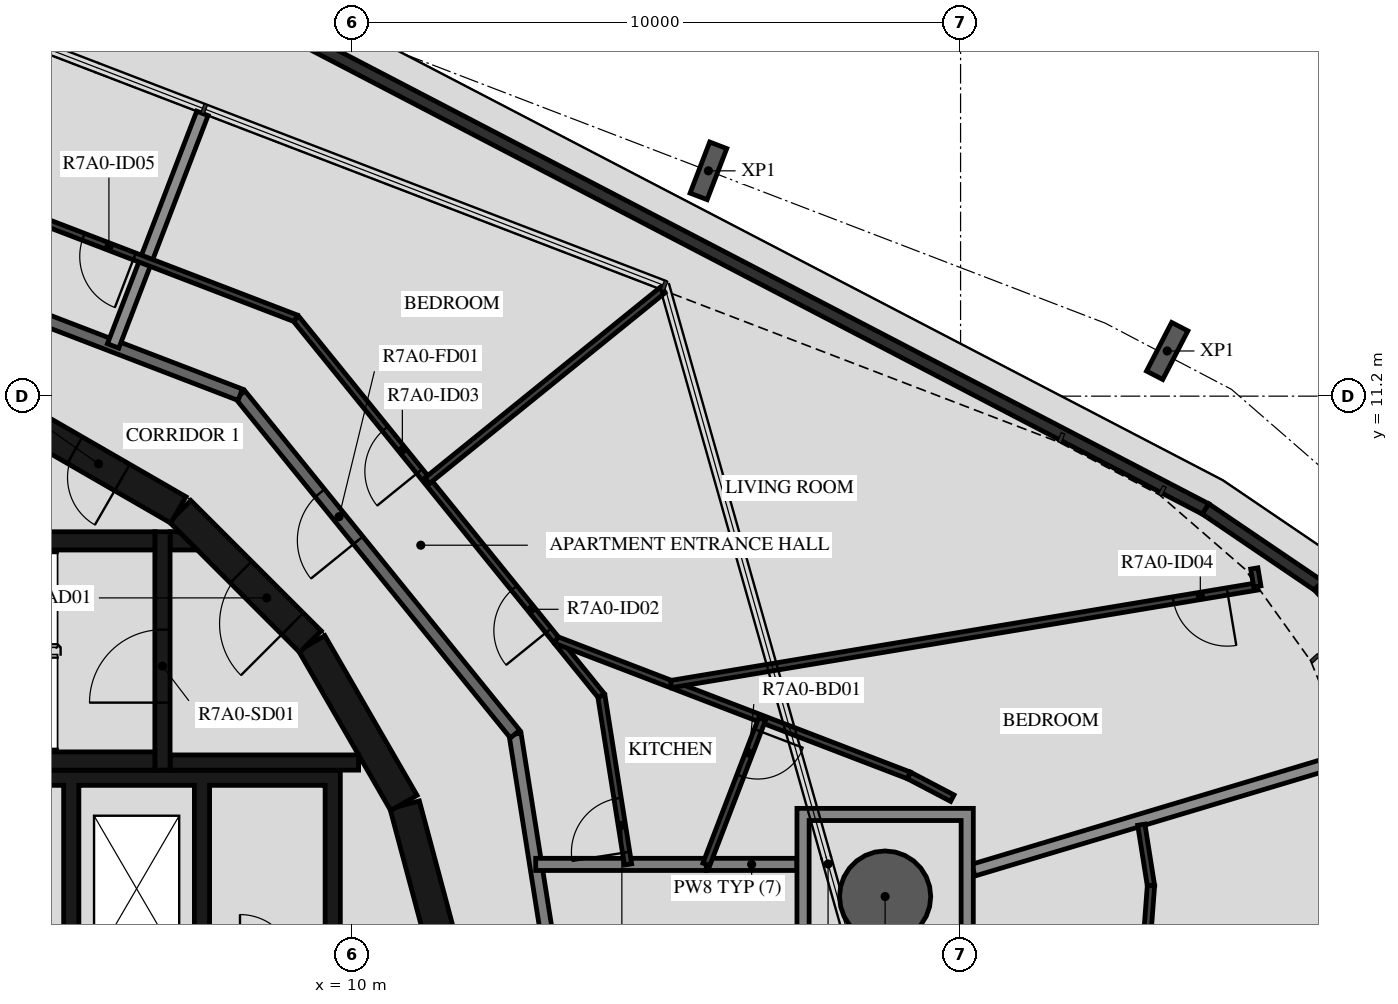
"""IFC4 building model, lengths in metres.
Left out: names, types, materials, properties, quantities, classifications, styles, units other than length and angle.
Written with IfcOpenShell. Run it as: python <this file> out.ifc"""

import sys

from ifc_helpers import new_model, si_unit, direction, frame, frame_2d, origin, origin_2d, place, context, subcontext, project, spatial, polyline, rectangle, hollow_circle, i_section, outline, extrude, element, fill, save


model = new_model("IFC4")
c1 = context("Model", 3, precision=1e-05, world=origin(), true_north=direction((0.0, 1.0)))
c2 = subcontext(c1, "Body", "Model", "MODEL_VIEW")
j1 = project(units=[si_unit("LENGTHUNIT", "METRE"), si_unit("PLANEANGLEUNIT", "RADIAN")], contexts=[c1])
p1 = place(None, origin())
s1 = spatial("IfcSite", under=j1, at=p1, CompositionType="ELEMENT")
p2 = place(p1, origin())
s2 = spatial("IfcBuilding", under=s1, at=p2, CompositionType="ELEMENT")
p3 = place(p2, frame((0.0, 0.0, 263.4)))
s3 = spatial("IfcBuildingStorey", under=s2, at=p3, CompositionType="ELEMENT", Elevation=263.4)
p4 = place(p3, frame((18.76, 2.971, -0.45), z_axis=(0.0, 0.0, 1.0), x_axis=(1.0, 0.0, 0.0)))
e1 = element("IfcColumn", 1, at=p4, inside=s3, PredefinedType="COLUMN", context=c2, shape_type="SweptSolid", body=[
    extrude(hollow_circle(Radius=0.75, WallThickness=0.035, at=origin_2d()), origin(), (0.0, 0.0, 1.0), 3.57),
])
for number, where, z_axis, x_axis in (
    (2, (23.398, 11.943, -0.45), (0.0, 0.0, 1.0), (0.888, -0.459, 0.0)),
    (3, (15.854, 14.905, -0.45), (0.0, 0.0, 1.0), (0.934, -0.358, 0.0)),
):
    element("IfcColumn", number, at=place(p3, frame(where, z_axis=z_axis, x_axis=x_axis)), inside=s3, PredefinedType="COLUMN", context=c2, shape_type="SweptSolid", body=[
        extrude(i_section(OverallWidth=0.3, OverallDepth=0.9, WebThickness=0.019, FlangeThickness=0.035, FilletRadius=0.03, at=origin_2d()), origin(), (0.0, 0.0, 1.0), 3.57),
    ])
p5 = place(p3, frame((-6.133, 25.046, 0.03), z_axis=(0.0, 0.0, 1.0), x_axis=(0.887010202007, -0.461749825701, 0.0)))
e4 = element("IfcWall", 4, at=p5, inside=s3, PredefinedType="PARAPET", context=c2, shape_type="SweptSolid", body=[
    extrude(rectangle(XDim=34.009, YDim=0.2, at=frame_2d((17.004, 0.0))), origin(), (0.0, 0.0, 1.0), 1.5),
])
p6 = place(p3, frame((24.029, 9.345, 0.03), z_axis=(0.0, 0.0, 1.0), x_axis=(0.827412960447, -0.561593975114, 0.0)))
e5 = element("IfcWall", 5, at=p6, inside=s3, PredefinedType="PARAPET", context=c2, shape_type="SweptSolid", body=[
    extrude(rectangle(XDim=2.258, YDim=0.2, at=frame_2d((1.129, 0.0))), origin(), (0.0, 0.0, 1.0), 1.5),
])
p7 = place(p3, frame((25.888, 8.085, 0.03), z_axis=(0.0, 0.0, 1.0), x_axis=(0.675590656091, -0.737276925858, 0.0)))
e6 = element("IfcWall", 6, at=p7, inside=s3, PredefinedType="PARAPET", context=c2, shape_type="SweptSolid", body=[
    extrude(rectangle(XDim=2.228, YDim=0.2, at=frame_2d((1.114, 0.0))), origin(), (0.0, 0.0, 1.0), 1.5),
])
for number, where, z_axis, x_axis in (
    (7, (11.643, 1.55, 0.0), (0.0, 0.0, 1.0), (-0.259, 0.966, 0.0)),
    (8, (10.845, 4.51, 0.0), (0.0, 0.0, 1.0), (-0.5, 0.866, 0.0)),
):
    element("IfcWall", number, at=place(p3, frame(where, z_axis=z_axis, x_axis=x_axis)), inside=s3, PredefinedType="SHEAR", context=c2, shape_type="SweptSolid", body=[
        extrude(rectangle(XDim=3.033, YDim=0.5, at=frame_2d((1.516, 0.0))), origin(), (0.0, 0.0, 1.0), 3.12),
    ])
p8 = place(p3, frame((9.308, 7.164, 0.0), z_axis=(0.0, 0.0, 1.0), x_axis=(-0.707106781187, 0.707106781187, 0.0)))
e9 = element("IfcWall", 9, at=p8, inside=s3, PredefinedType="SHEAR", context=c2, shape_type="SweptSolid", body=[
    extrude(rectangle(XDim=3.032, YDim=0.5, at=frame_2d((1.516, 0.0))), origin(), (0.0, 0.0, 1.0), 3.12),
])
p9 = place(p8, frame((0.416, 0.0, 0.0)))
e10 = element("IfcOpeningElement", 10, at=p9, cuts=e9, PredefinedType="OPENING", context=c2, shape_type="SweptSolid", body=[
    extrude(rectangle(XDim=1.2, YDim=2.1, at=frame_2d((0.6, 1.05))), frame((0.0, 0.26, 0.0), z_axis=(0.0, -1.0, 0.0), x_axis=(1.0, 0.0, 0.0)), (0.0, 0.0, 1.0), 0.52),
])
p10 = place(p3, frame((7.137, 9.329, 0.0), z_axis=(0.0, 0.0, 1.0), x_axis=(-0.865975092491, 0.500087131594, 0.0)))
e11 = element("IfcWall", 11, at=p10, inside=s3, PredefinedType="SHEAR", context=c2, shape_type="SweptSolid", body=[
    extrude(rectangle(XDim=3.033, YDim=0.5, at=frame_2d((1.516, 0.0))), origin(), (0.0, 0.0, 1.0), 3.12),
])
p11 = place(p10, frame((1.066, 0.0, 0.0)))
e12 = element("IfcOpeningElement", 12, at=p11, cuts=e11, PredefinedType="OPENING", context=c2, shape_type="SweptSolid", body=[
    extrude(rectangle(XDim=0.9, YDim=2.1, at=frame_2d((0.45, 1.05))), frame((0.0, 0.26, 0.0), z_axis=(0.0, -1.0, 0.0), x_axis=(1.0, 0.0, 0.0)), (0.0, 0.0, 1.0), 0.52),
])
for number, where, z_axis, x_axis in (
    (13, (0.0, 5.2, 0.0), (0.0, 0.0, 1.0), (1.0, 0.0, 0.0)),
    (14, (0.0, 8.82, 0.0), (0.0, 0.0, 1.0), (1.0, 0.0, 0.0)),
):
    element("IfcWall", number, at=place(p3, frame(where, z_axis=z_axis, x_axis=x_axis)), inside=s3, PredefinedType="SHEAR", context=c2, shape_type="SweptSolid", body=[
        extrude(rectangle(XDim=6.75, YDim=0.3, at=frame_2d((3.375, 0.0))), origin(), (0.0, 0.0, 1.0), 3.12),
    ])
p12 = place(p3, frame((6.875, 5.05, 0.0), z_axis=(0.0, 0.0, 1.0), x_axis=(0.0, 1.0, 0.0)))
e15 = element("IfcWall", 15, at=p12, inside=s3, PredefinedType="SHEAR", context=c2, shape_type="SweptSolid", body=[
    extrude(rectangle(XDim=3.92, YDim=0.25, at=frame_2d((1.96, 0.0))), origin(), (0.0, 0.0, 1.0), 3.12),
])
p13 = place(p12, frame((1.11, 0.0, 0.0)))
e16 = element("IfcOpeningElement", 16, at=p13, cuts=e15, PredefinedType="OPENING", context=c2, shape_type="SweptSolid", body=[
    extrude(rectangle(XDim=1.2, YDim=2.1, at=frame_2d((0.6, 1.05))), frame((0.0, 0.135, 0.0), z_axis=(0.0, -1.0, 0.0), x_axis=(1.0, 0.0, 0.0)), (0.0, 0.0, 1.0), 0.27),
])
p14 = place(p3, frame((7.0, 5.175, 0.0), z_axis=(0.0, 0.0, 1.0), x_axis=(1.0, 0.0, 0.0)))
e17 = element("IfcWall", 17, at=p14, inside=s3, PredefinedType="SHEAR", context=c2, shape_type="SweptSolid", body=[
    extrude(rectangle(XDim=3.1, YDim=0.25, at=frame_2d((1.55, 0.0))), origin(), (0.0, 0.0, 1.0), 3.12),
])
p15 = place(p3, origin())
e18 = element("IfcWall", 18, at=p15, inside=s3, PredefinedType="SHEAR", context=c2, shape_type="SweptSolid", body=[
    extrude(outline(polyline([(7.448, 8.67), (7.0, 8.67), (7.0, 8.97), (7.148, 8.97), (7.448, 8.67)])), origin(), (0.0, 0.0, 1.0), 3.12),
])
p16 = place(p3, origin())
e19 = element("IfcWall", 19, at=p16, inside=s3, PredefinedType="SHEAR", context=c2, shape_type="SweptSolid", body=[
    extrude(outline(polyline([(-9.8, 1.9), (-9.55, 1.9), (-9.55, 4.8), (3.1, 4.8), (3.1, 1.9), (3.35, 1.9), (3.35, 4.8), (5.25, 4.8), (5.25, 1.9), (5.5, 1.9), (5.5, 4.8), (7.4, 4.8), (7.4, 1.9), (7.65, 1.9), (7.65, 4.8), (9.55, 4.8), (9.55, 1.9), (9.8, 1.9), (9.8, 4.8), (9.8, 5.05), (-9.8, 5.05), (-9.8, 4.8), (-9.8, 1.9)])), origin(), (0.0, 0.0, 1.0), 3.12),
])
p17 = place(p3, frame((13.797, -1.45, 0.0), z_axis=(0.0, 0.0, 1.0), x_axis=(-0.156421704315, 0.987690361611, 0.0)))
e20 = element("IfcWall", 20, at=p17, inside=s3, PredefinedType="STANDARD", context=c2, shape_type="SweptSolid", body=[
    extrude(rectangle(XDim=7.181, YDim=0.2, at=frame_2d((3.591, 0.0))), origin(), (0.0, 0.0, 1.0), 3.12),
])
p18 = place(p3, frame((12.673, 5.643, 0.0), z_axis=(0.0, 0.0, 1.0), x_axis=(-0.629302871585, 0.777160148113, 0.0)))
e21 = element("IfcWall", 21, at=p18, inside=s3, PredefinedType="STANDARD", context=c2, shape_type="SweptSolid", body=[
    extrude(rectangle(XDim=7.181, YDim=0.2, at=frame_2d((3.59, 0.0))), origin(), (0.0, 0.0, 1.0), 3.12),
])
p19 = place(p18, frame((4.1, 0.0, 0.0)))
e22 = element("IfcOpeningElement", 22, at=p19, cuts=e21, PredefinedType="OPENING", context=c2, shape_type="SweptSolid", body=[
    extrude(rectangle(XDim=1.0, YDim=2.1, at=frame_2d((0.5, 1.05))), frame((0.0, 0.11, 0.0), z_axis=(0.0, -1.0, 0.0), x_axis=(1.0, 0.0, 0.0)), (0.0, 0.0, 1.0), 0.22),
])
p20 = place(p3, frame((8.154, 11.223, 0.0), z_axis=(0.0, 0.0, 1.0), x_axis=(-0.93359073609, 0.358341090983, 0.0)))
e23 = element("IfcWall", 23, at=p20, inside=s3, PredefinedType="STANDARD", context=c2, shape_type="SweptSolid", body=[
    extrude(rectangle(XDim=7.181, YDim=0.2, at=frame_2d((3.59, 0.0))), origin(), (0.0, 0.0, 1.0), 3.12),
])
p21 = place(p3, frame((15.819, 3.5, 0.0), z_axis=(0.0, 0.0, 1.0), x_axis=(-1.0, 0.0, 0.0)))
e24 = element("IfcWall", 24, at=p21, inside=s3, PredefinedType="STANDARD", context=c2, shape_type="SweptSolid", body=[
    extrude(rectangle(XDim=2.806, YDim=0.2, at=frame_2d((1.403, 0.0))), origin(), (0.0, 0.0, 1.0), 3.12),
])
p22 = place(p3, frame((17.309, 3.5, 0.0), z_axis=(0.0, 0.0, 1.0), x_axis=(-1.0, 0.0, 0.0)))
e25 = element("IfcWall", 25, at=p22, inside=s3, PredefinedType="STANDARD", context=c2, shape_type="SweptSolid", body=[
    extrude(rectangle(XDim=1.49, YDim=0.2, at=frame_2d((0.745, 0.0))), origin(), (0.0, 0.0, 1.0), 3.12),
])
p23 = place(p3, frame((7.532, 15.85, 0.0), z_axis=(0.0, 0.0, 1.0), x_axis=(-0.358355996975, -0.933585014571, 0.0)))
e26 = element("IfcWall", 26, at=p23, inside=s3, PredefinedType="STANDARD", context=c2, shape_type="SweptSolid", body=[
    extrude(rectangle(XDim=4.096, YDim=0.2, at=frame_2d((2.048, 0.0))), origin(), (0.0, 0.0, 1.0), 2.73),
])
p24 = place(p3, frame((20.209, 3.405, 0.0), z_axis=(0.0, 0.0, 1.0), x_axis=(0.957991224208, 0.286797514529, 0.0)))
e27 = element("IfcWall", 27, at=p24, inside=s3, PredefinedType="STANDARD", context=c2, shape_type="SweptSolid", body=[
    extrude(rectangle(XDim=6.471, YDim=0.2, at=frame_2d((3.236, 0.0))), origin(), (0.0, 0.0, 1.0), 2.73),
])
p25 = place(p3, frame((14.531, 3.5, 0.0), z_axis=(0.0, 0.0, 1.0), x_axis=(-0.1564580042, 0.987684612071, 0.0)))
e28 = element("IfcWall", 28, at=p25, inside=s3, PredefinedType="PARTITIONING", context=c2, shape_type="SweptSolid", body=[
    extrude(rectangle(XDim=2.809, YDim=0.12, at=frame_2d((1.404, 0.0))), origin(), (0.0, 0.0, 1.0), 3.12),
])
p26 = place(p25, frame((0.2, 0.0, 0.0)))
e29 = element("IfcOpeningElement", 29, at=p26, cuts=e28, PredefinedType="OPENING", context=c2, shape_type="SweptSolid", body=[
    extrude(rectangle(XDim=0.9, YDim=2.1, at=frame_2d((0.45, 1.05))), frame((0.0, 0.07, 0.0), z_axis=(0.0, -1.0, 0.0), x_axis=(1.0, 0.0, 0.0)), (0.0, 0.0, 1.0), 0.14),
])
p27 = place(p3, frame((14.092, 6.274, 0.0), z_axis=(0.0, 0.0, 1.0), x_axis=(-0.62933367237, 0.777135206268, 0.0)))
e30 = element("IfcWall", 30, at=p27, inside=s3, PredefinedType="PARTITIONING", context=c2, shape_type="SweptSolid", body=[
    extrude(rectangle(XDim=7.985, YDim=0.12, at=frame_2d((3.992, 0.0))), origin(), (0.0, 0.0, 1.0), 3.12),
])
p28 = place(p27, frame((1.378, 0.0, 0.0)))
e31 = element("IfcOpeningElement", 31, at=p28, cuts=e30, PredefinedType="OPENING", context=c2, shape_type="SweptSolid", body=[
    extrude(rectangle(XDim=0.9, YDim=2.1, at=frame_2d((0.45, 1.05))), frame((0.0, 0.07, 0.0), z_axis=(0.0, -1.0, 0.0), x_axis=(1.0, 0.0, 0.0)), (0.0, 0.0, 1.0), 0.14),
])
p29 = place(p27, frame((4.749, 0.0, 0.0)))
e32 = element("IfcOpeningElement", 32, at=p29, cuts=e30, PredefinedType="OPENING", context=c2, shape_type="SweptSolid", body=[
    extrude(rectangle(XDim=0.9, YDim=2.1, at=frame_2d((0.45, 1.05))), frame((0.0, 0.07, 0.0), z_axis=(0.0, -1.0, 0.0), x_axis=(1.0, 0.0, 0.0)), (0.0, 0.0, 1.0), 0.14),
])
p30 = place(p3, frame((9.067, 12.479, 0.0), z_axis=(0.0, 0.0, 1.0), x_axis=(-0.933579449035, 0.358370495911, 0.0)))
e33 = element("IfcWall", 33, at=p30, inside=s3, PredefinedType="PARTITIONING", context=c2, shape_type="SweptSolid", body=[
    extrude(rectangle(XDim=7.985, YDim=0.12, at=frame_2d((3.992, 0.0))), origin(), (0.0, 0.0, 1.0), 3.12),
])
p31 = place(p30, frame((2.841, 0.0, 0.0)))
e34 = element("IfcOpeningElement", 34, at=p31, cuts=e33, PredefinedType="OPENING", context=c2, shape_type="SweptSolid", body=[
    extrude(rectangle(XDim=0.9, YDim=2.1, at=frame_2d((0.45, 1.05))), frame((0.0, 0.07, 0.0), z_axis=(0.0, -1.0, 0.0), x_axis=(1.0, 0.0, 0.0)), (0.0, 0.0, 1.0), 0.14),
])
p32 = place(p3, frame((19.865, 4.589, 0.0), z_axis=(0.0, 0.0, 1.0), x_axis=(-0.885855229108, 0.46396175819, 0.0)))
e35 = element("IfcWall", 35, at=p32, inside=s3, PredefinedType="PARTITIONING", context=c2, shape_type="SweptSolid", body=[
    extrude(rectangle(XDim=0.807, YDim=0.12, at=frame_2d((0.403, 0.0))), origin(), (0.0, 0.0, 1.0), 3.12),
])
p33 = place(p3, frame((19.15, 4.963, 0.0), z_axis=(0.0, 0.0, 1.0), x_axis=(-0.933571304602, 0.358391711992, 0.0)))
e36 = element("IfcWall", 36, at=p33, inside=s3, PredefinedType="PARTITIONING", context=c2, shape_type="SweptSolid", body=[
    extrude(rectangle(XDim=6.212, YDim=0.12, at=frame_2d((3.106, 0.0))), origin(), (0.0, 0.0, 1.0), 3.12),
])
p34 = place(p3, frame((16.737, 5.89, 0.0), z_axis=(0.0, 0.0, 1.0), x_axis=(-0.358397454141, -0.933569100209, 0.0)))
e37 = element("IfcWall", 37, at=p34, inside=s3, PredefinedType="PARTITIONING", context=c2, shape_type="SweptSolid", body=[
    extrude(rectangle(XDim=2.56, YDim=0.12, at=frame_2d((1.28, 0.0))), origin(), (0.0, 0.0, 1.0), 3.12),
])
p35 = place(p34, frame((0.2, 0.0, 0.0)))
e38 = element("IfcOpeningElement", 38, at=p35, cuts=e37, PredefinedType="OPENING", context=c2, shape_type="SweptSolid", body=[
    extrude(rectangle(XDim=0.8, YDim=2.1, at=frame_2d((0.4, 1.05))), frame((0.0, 0.07, 0.0), z_axis=(0.0, -1.0, 0.0), x_axis=(1.0, 0.0, 0.0)), (0.0, 0.0, 1.0), 0.14),
])
p36 = place(p3, frame((24.88, 8.071, 0.0), z_axis=(0.0, 0.0, 1.0), x_axis=(-0.986414168431, -0.164277473558, 0.0)))
e39 = element("IfcWall", 39, at=p36, inside=s3, PredefinedType="PARTITIONING", context=c2, shape_type="SweptSolid", body=[
    extrude(rectangle(XDim=9.774, YDim=0.12, at=frame_2d((4.887, 0.0))), origin(), (0.0, 0.0, 1.0), 3.12),
])
p37 = place(p36, frame((0.5, 0.0, 0.0)))
e40 = element("IfcOpeningElement", 40, at=p37, cuts=e39, PredefinedType="OPENING", context=c2, shape_type="SweptSolid", body=[
    extrude(rectangle(XDim=0.9, YDim=2.1, at=frame_2d((0.45, 1.05))), frame((0.0, 0.07, 0.0), z_axis=(0.0, -1.0, 0.0), x_axis=(1.0, 0.0, 0.0)), (0.0, 0.0, 1.0), 0.14),
])
p38 = place(p3, frame((15.101, 12.945, 0.0), z_axis=(0.0, 0.0, 1.0), x_axis=(-0.777178675378, -0.629279990575, 0.0)))
e41 = element("IfcWall", 41, at=p38, inside=s3, PredefinedType="PARTITIONING", context=c2, shape_type="SweptSolid", body=[
    extrude(rectangle(XDim=4.982, YDim=0.12, at=frame_2d((2.491, 0.0))), origin(), (0.0, 0.0, 1.0), 3.12),
])
p39 = place(p3, frame((22.972, 4.153, 0.0), z_axis=(0.0, 0.0, 1.0), x_axis=(0.156209385929, -0.987723963336, 0.0)))
e42 = element("IfcWall", 42, at=p39, inside=s3, PredefinedType="PARTITIONING", context=c2, shape_type="SweptSolid", body=[
    extrude(rectangle(XDim=1.016, YDim=0.12, at=frame_2d((0.508, 0.0))), origin(), (0.0, 0.0, 1.0), 3.12),
])
p40 = place(p3, frame((23.131, 3.149, 0.0), z_axis=(0.0, 0.0, 1.0), x_axis=(-0.075446997935, -0.99714981347, 0.0)))
e43 = element("IfcWall", 43, at=p40, inside=s3, PredefinedType="PARTITIONING", context=c2, shape_type="SweptSolid", body=[
    extrude(rectangle(XDim=1.016, YDim=0.12, at=frame_2d((0.508, 0.0))), origin(), (0.0, 0.0, 1.0), 3.12),
])
p41 = place(p3, frame((24.88, 8.071, 0.0), z_axis=(0.0, 0.0, 1.0), x_axis=(-0.164398987305, 0.986393923832, 0.0)))
e44 = element("IfcWall", 44, at=p41, inside=s3, PredefinedType="PARTITIONING", context=c2, shape_type="SweptSolid", body=[
    extrude(rectangle(XDim=0.3, YDim=0.12, at=frame_2d((0.15, 0.0))), origin(), (0.0, 0.0, 1.0), 3.12),
])
p42 = place(p3, origin())
e45 = element("IfcWall", 45, at=p42, inside=s3, PredefinedType="STANDARD", context=c2, shape_type="SweptSolid", body=[
    extrude(outline(polyline([(20.209, 4.421), (20.209, 1.521), (17.309, 1.521), (17.309, 4.421), (20.209, 4.421)]), holes=[polyline([(17.51, 1.721), (20.01, 1.721), (20.01, 4.221), (17.51, 4.221), (17.51, 1.721)])]), origin(), (0.0, 0.0, 1.0), 3.12),
])
p43 = place(p13, origin())
e46 = element("IfcDoor", 46, at=p43, inside=s3, OperationType="SINGLE_SWING_LEFT", PredefinedType="DOOR", context=c2, shape_type="SweptSolid", body=[
    extrude(rectangle(XDim=1.2, YDim=2.1, at=frame_2d((0.6, 1.05))), frame((0.0, 0.025, 0.0), z_axis=(0.0, -1.0, 0.0), x_axis=(1.0, 0.0, 0.0)), (0.0, 0.0, 1.0), 0.05),
])
fill(e16, e46)
p44 = place(p9, origin())
e47 = element("IfcDoor", 47, at=p44, inside=s3, OperationType="SINGLE_SWING_RIGHT", PredefinedType="DOOR", context=c2, shape_type="SweptSolid", body=[
    extrude(rectangle(XDim=1.2, YDim=2.1, at=frame_2d((0.6, 1.05))), frame((0.0, 0.025, 0.0), z_axis=(0.0, -1.0, 0.0), x_axis=(1.0, 0.0, 0.0)), (0.0, 0.0, 1.0), 0.05),
])
fill(e10, e47)
p45 = place(p11, origin())
e48 = element("IfcDoor", 48, at=p45, inside=s3, OperationType="SINGLE_SWING_LEFT", PredefinedType="DOOR", context=c2, shape_type="SweptSolid", body=[
    extrude(rectangle(XDim=0.9, YDim=2.1, at=frame_2d((0.45, 1.05))), frame((0.0, 0.025, 0.0), z_axis=(0.0, -1.0, 0.0), x_axis=(1.0, 0.0, 0.0)), (0.0, 0.0, 1.0), 0.05),
])
fill(e12, e48)
p46 = place(p19, origin())
e49 = element("IfcDoor", 49, at=p46, inside=s3, OperationType="SINGLE_SWING_LEFT", PredefinedType="DOOR", context=c2, shape_type="SweptSolid", body=[
    extrude(rectangle(XDim=1.0, YDim=2.1, at=frame_2d((0.5, 1.05))), frame((0.0, 0.025, 0.0), z_axis=(0.0, -1.0, 0.0), x_axis=(1.0, 0.0, 0.0)), (0.0, 0.0, 1.0), 0.05),
])
fill(e22, e49)
p47 = place(p26, origin())
e50 = element("IfcDoor", 50, at=p47, inside=s3, OperationType="SINGLE_SWING_LEFT", PredefinedType="DOOR", context=c2, shape_type="SweptSolid", body=[
    extrude(rectangle(XDim=0.9, YDim=2.1, at=frame_2d((0.45, 1.05))), frame((0.0, 0.025, 0.0), z_axis=(0.0, -1.0, 0.0), x_axis=(1.0, 0.0, 0.0)), (0.0, 0.0, 1.0), 0.05),
])
fill(e29, e50)
p48 = place(p28, origin())
e51 = element("IfcDoor", 51, at=p48, inside=s3, OperationType="SINGLE_SWING_LEFT", PredefinedType="DOOR", context=c2, shape_type="SweptSolid", body=[
    extrude(rectangle(XDim=0.9, YDim=2.1, at=frame_2d((0.45, 1.05))), frame((0.0, 0.025, 0.0), z_axis=(0.0, -1.0, 0.0), x_axis=(1.0, 0.0, 0.0)), (0.0, 0.0, 1.0), 0.05),
])
fill(e31, e51)
p49 = place(p29, origin())
e52 = element("IfcDoor", 52, at=p49, inside=s3, OperationType="SINGLE_SWING_LEFT", PredefinedType="DOOR", context=c2, shape_type="SweptSolid", body=[
    extrude(rectangle(XDim=0.9, YDim=2.1, at=frame_2d((0.45, 1.05))), frame((0.0, 0.025, 0.0), z_axis=(0.0, -1.0, 0.0), x_axis=(1.0, 0.0, 0.0)), (0.0, 0.0, 1.0), 0.05),
])
fill(e32, e52)
p50 = place(p35, origin())
e53 = element("IfcDoor", 53, at=p50, inside=s3, OperationType="SINGLE_SWING_LEFT", PredefinedType="DOOR", context=c2, shape_type="SweptSolid", body=[
    extrude(rectangle(XDim=0.8, YDim=2.1, at=frame_2d((0.4, 1.05))), frame((0.0, 0.025, 0.0), z_axis=(0.0, -1.0, 0.0), x_axis=(1.0, 0.0, 0.0)), (0.0, 0.0, 1.0), 0.05),
])
fill(e38, e53)
p51 = place(p37, origin())
e54 = element("IfcDoor", 54, at=p51, inside=s3, OperationType="SINGLE_SWING_LEFT", PredefinedType="DOOR", context=c2, shape_type="SweptSolid", body=[
    extrude(rectangle(XDim=0.9, YDim=2.1, at=frame_2d((0.45, 1.05))), frame((0.0, 0.025, 0.0), z_axis=(0.0, -1.0, 0.0), x_axis=(1.0, 0.0, 0.0)), (0.0, 0.0, 1.0), 0.05),
])
fill(e40, e54)
p52 = place(p31, origin())
e55 = element("IfcDoor", 55, at=p52, inside=s3, OperationType="SINGLE_SWING_LEFT", PredefinedType="DOOR", context=c2, shape_type="SweptSolid", body=[
    extrude(rectangle(XDim=0.9, YDim=2.1, at=frame_2d((0.45, 1.05))), frame((0.0, 0.025, 0.0), z_axis=(0.0, -1.0, 0.0), x_axis=(1.0, 0.0, 0.0)), (0.0, 0.0, 1.0), 0.05),
])
fill(e34, e55)
save(model, sys.argv[1])
